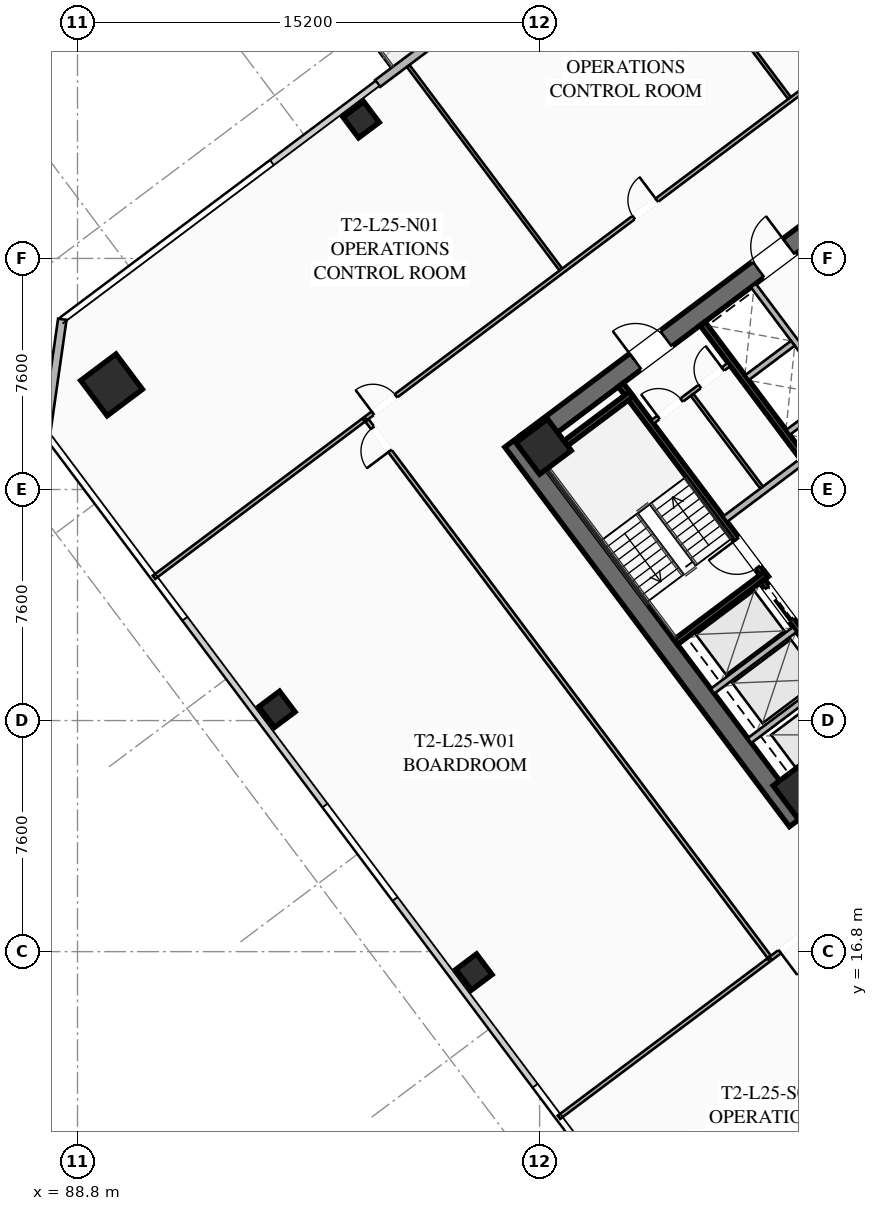
"""IFC4 building model, lengths in metres.
Left out: names, types, materials, properties, quantities, classifications, styles, units other than length and angle.
Written with IfcOpenShell. Run it as: python <this file> out.ifc"""

import sys

from ifc_helpers import new_model, si_unit, direction, frame, frame_2d, origin, origin_2d, place, context, subcontext, project, spatial, rectangle, hollow_rectangle, extrude, element, fill, save


model = new_model("IFC4")
c1 = context("Model", 3, precision=1e-05, world=origin(), true_north=direction((0.0, 1.0)))
c2 = subcontext(c1, "Body", "Model", "MODEL_VIEW")
j1 = project(units=[si_unit("LENGTHUNIT", "METRE"), si_unit("PLANEANGLEUNIT", "RADIAN")], contexts=[c1])
p1 = place(None, origin())
s1 = spatial("IfcSite", under=j1, at=p1, CompositionType="ELEMENT")
p2 = place(p1, origin())
s2 = spatial("IfcBuilding", under=s1, at=p2, CompositionType="ELEMENT")
p3 = place(p2, frame((0.0, 0.0, 95.6)))
s3 = spatial("IfcBuildingStorey", under=s2, at=p3, CompositionType="ELEMENT", Elevation=95.6)
p4 = place(p3, frame((112.476, 21.107, 0.0), z_axis=(0.0, 0.0, 1.0), x_axis=(-0.600005007985, 0.799996243986, 0.0)))
e1 = element("IfcWall", 1, at=p4, inside=s3, PredefinedType="SHEAR", context=c2, shape_type="SweptSolid", body=[
    extrude(rectangle(XDim=15.6, YDim=0.65, at=frame_2d((7.8, 0.0))), origin(), (0.0, 0.0, 1.0), 3.55),
])
p5 = place(p3, frame((124.429, 30.478, 0.0), z_axis=(0.0, 0.0, 1.0), x_axis=(-0.799998028465, -0.600002628705, 0.0)))
e2 = element("IfcWall", 2, at=p5, inside=s3, PredefinedType="SHEAR", context=c2, shape_type="SweptSolid", body=[
    extrude(rectangle(XDim=14.86, YDim=0.65, at=frame_2d((7.43, 0.0))), origin(), (0.0, 0.0, 1.0), 3.55),
])
p6 = place(p5, frame((9.13, 0.0, 0.0)))
e3 = element("IfcOpeningElement", 3, at=p6, cuts=e2, PredefinedType="OPENING", context=c2, shape_type="SweptSolid", body=[
    extrude(rectangle(XDim=1.25, YDim=2.25, at=frame_2d((0.625, 1.125))), frame((0.0, 0.335, 0.0), z_axis=(0.0, -1.0, 0.0), x_axis=(1.0, 0.0, 0.0)), (0.0, 0.0, 1.0), 0.67),
])
p7 = place(p5, frame((4.08, 0.0, 0.0)))
e4 = element("IfcOpeningElement", 4, at=p7, cuts=e2, PredefinedType="OPENING", context=c2, shape_type="SweptSolid", body=[
    extrude(rectangle(XDim=1.25, YDim=2.25, at=frame_2d((0.625, 1.125))), frame((0.0, 0.335, 0.0), z_axis=(0.0, -1.0, 0.0), x_axis=(1.0, 0.0, 0.0)), (0.0, 0.0, 1.0), 0.67),
])
p8 = place(p3, frame((103.571, 33.522, 0.0), z_axis=(0.0, 0.0, 1.0), x_axis=(0.799998028465, 0.600002628705, 0.0)))
e5 = element("IfcWall", 5, at=p8, inside=s3, PredefinedType="SHEAR", context=c2, shape_type="SweptSolid", body=[
    extrude(rectangle(XDim=14.86, YDim=0.65, at=frame_2d((7.43, 0.0))), origin(), (0.0, 0.0, 1.0), 3.55),
])
p9 = place(p8, frame((4.48, 0.0, 0.0)))
e6 = element("IfcOpeningElement", 6, at=p9, cuts=e5, PredefinedType="OPENING", context=c2, shape_type="SweptSolid", body=[
    extrude(rectangle(XDim=1.25, YDim=2.25, at=frame_2d((0.625, 1.125))), frame((0.0, 0.335, 0.0), z_axis=(0.0, -1.0, 0.0), x_axis=(1.0, 0.0, 0.0)), (0.0, 0.0, 1.0), 0.67),
])
p10 = place(p8, frame((9.53, 0.0, 0.0)))
e7 = element("IfcOpeningElement", 7, at=p10, cuts=e5, PredefinedType="OPENING", context=c2, shape_type="SweptSolid", body=[
    extrude(rectangle(XDim=1.25, YDim=2.25, at=frame_2d((0.625, 1.125))), frame((0.0, 0.335, 0.0), z_axis=(0.0, -1.0, 0.0), x_axis=(1.0, 0.0, 0.0)), (0.0, 0.0, 1.0), 0.67),
])
for number, where, z_axis, x_axis in (
    (8, (112.59, 22.13, 0.0), (0.0, 0.0, 1.0), (0.8, 0.6, 0.0)),
    (9, (104.13, 33.41, 0.0), (0.0, 0.0, 1.0), (0.8, 0.6, 0.0)),
):
    element("IfcColumn", number, at=place(p3, frame(where, z_axis=z_axis, x_axis=x_axis)), inside=s3, PredefinedType="COLUMN", context=c2, shape_type="SweptSolid", body=[
        extrude(hollow_rectangle(XDim=1.3, YDim=1.3, WallThickness=0.05, at=origin_2d()), origin(), (0.0, 0.0, 1.0), 3.35),
    ])
p11 = place(p3, frame((89.92, 35.44, 0.0), z_axis=(0.0, 0.0, 1.0), x_axis=(0.799999996291, 0.600000004945, 0.0)))
e10 = element("IfcColumn", 10, at=p11, inside=s3, PredefinedType="COLUMN", context=c2, shape_type="SweptSolid", body=[
    extrude(hollow_rectangle(XDim=1.45, YDim=1.45, WallThickness=0.055, at=origin_2d()), origin(), (0.0, 0.0, 1.0), 3.35),
])
for number, where, z_axis, x_axis in (
    (11, (98.13, 44.16, 0.0), (0.0, 0.0, 1.0), (0.8, 0.6, 0.0)),
    (12, (95.36, 24.77, 0.0), (0.0, 0.0, 1.0), (0.8, 0.6, 0.0)),
    (13, (101.84, 16.13, 0.0), (0.0, 0.0, 1.0), (0.8, 0.6, 0.0)),
):
    element("IfcColumn", number, at=place(p3, frame(where, z_axis=z_axis, x_axis=x_axis)), inside=s3, PredefinedType="COLUMN", context=c2, shape_type="SweptSolid", body=[
        extrude(hollow_rectangle(XDim=0.85, YDim=0.85, WallThickness=0.035, at=origin_2d()), origin(), (0.0, 0.0, 1.0), 3.35),
    ])
p12 = place(p3, frame((98.672, 45.354, 0.0), z_axis=(0.0, 0.0, 1.0), x_axis=(0.799986212866, 0.600018382406, 0.0)))
e14 = element("IfcWall", 14, at=p12, inside=s3, PredefinedType="SOLIDWALL", context=c2, shape_type="SweptSolid", body=[
    extrude(rectangle(XDim=8.5, YDim=0.28, at=frame_2d((4.25, 0.0))), origin(), (0.0, 0.0, 1.0), 3.35),
])
p13 = place(p12, frame((3.6, 0.0, 0.0)))
e15 = element("IfcOpeningElement", 15, at=p13, cuts=e14, PredefinedType="OPENING", context=c2, shape_type="SweptSolid", body=[
    extrude(rectangle(XDim=1.3, YDim=2.15, at=frame_2d((0.65, 1.075))), frame((0.0, 0.15, 0.0), z_axis=(0.0, -1.0, 0.0), x_axis=(1.0, 0.0, 0.0)), (0.0, 0.0, 1.0), 0.3),
])
p14 = place(p12, frame((5.24, 0.0, 0.85)))
e16 = element("IfcOpeningElement", 16, at=p14, cuts=e14, PredefinedType="OPENING", context=c2, shape_type="SweptSolid", body=[
    extrude(rectangle(XDim=1.8, YDim=1.92, at=frame_2d((0.9, 0.96))), frame((0.0, 0.15, 0.0), z_axis=(0.0, -1.0, 0.0), x_axis=(1.0, 0.0, 0.0)), (0.0, 0.0, 1.0), 0.3),
])
p15 = place(p3, frame((87.76, 33.82, 0.0), z_axis=(0.0, 0.0, 1.0), x_axis=(0.141430307517, 0.989948214866, 0.0)))
e17 = element("IfcWall", 17, at=p15, inside=s3, PredefinedType="SOLIDWALL", context=c2, shape_type="SweptSolid", body=[
    extrude(rectangle(XDim=3.818, YDim=0.28, at=frame_2d((1.909, 0.0))), origin(), (0.0, 0.0, 1.0), 3.35),
])
p16 = place(p3, frame((111.44, 29.08, 0.0), z_axis=(0.0, 0.0, 1.0), x_axis=(-0.600009827119, 0.799992629566, 0.0)))
e18 = element("IfcWall", 18, at=p16, inside=s3, PredefinedType="SHEAR", context=c2, shape_type="SweptSolid", body=[
    extrude(rectangle(XDim=7.95, YDim=0.2, at=frame_2d((3.975, 0.0))), origin(), (0.0, 0.0, 1.0), 3.35),
])
p17 = place(p16, frame((0.45, 0.0, 0.0)))
e19 = element("IfcOpeningElement", 19, at=p17, cuts=e18, PredefinedType="OPENING", context=c2, shape_type="SweptSolid", body=[
    extrude(rectangle(XDim=1.15, YDim=2.2, at=frame_2d((0.575, 1.1))), frame((0.0, 0.11, 0.0), z_axis=(0.0, -1.0, 0.0), x_axis=(1.0, 0.0, 0.0)), (0.0, 0.0, 1.0), 0.22),
])
for number, where, z_axis, x_axis in (
    (20, (108.476, 26.982, 0.0), (0.0, 0.0, 1.0), (0.8, 0.6, 0.0)),
    (21, (104.036, 32.902, 0.0), (0.0, 0.0, 1.0), (0.8, 0.6, 0.0)),
):
    element("IfcWall", number, at=place(p3, frame(where, z_axis=z_axis, x_axis=x_axis)), inside=s3, PredefinedType="SHEAR", context=c2, shape_type="SweptSolid", body=[
        extrude(rectangle(XDim=3.73, YDim=0.2, at=frame_2d((1.865, 0.0))), origin(), (0.0, 0.0, 1.0), 3.35),
    ])
p18 = place(p3, frame((117.938, 26.016, 0.0), z_axis=(0.0, 0.0, 1.0), x_axis=(-0.600005463273, 0.799995902516, 0.0)))
e22 = element("IfcWall", 22, at=p18, inside=s3, PredefinedType="SHEAR", context=c2, shape_type="SweptSolid", body=[
    extrude(rectangle(XDim=14.3, YDim=0.2, at=frame_2d((7.15, 0.0))), origin(), (0.0, 0.0, 1.0), 3.35),
])
p19 = place(p3, frame((110.104, 31.028, 0.0), z_axis=(0.0, 0.0, 1.0), x_axis=(0.800018601094, 0.59997519774, 0.0)))
e23 = element("IfcWall", 23, at=p19, inside=s3, PredefinedType="SOLIDWALL", context=c2, shape_type="SweptSolid", body=[
    extrude(rectangle(XDim=3.15, YDim=0.22, at=frame_2d((1.575, 0.0))), origin(), (0.0, 0.0, 1.0), 2.703),
])
p20 = place(p3, frame((115.13, 23.91, 0.0), z_axis=(0.0, 0.0, 1.0), x_axis=(-0.599975393228, 0.800018454488, 0.0)))
e24 = element("IfcWall", 24, at=p20, inside=s3, PredefinedType="SHEAR", context=c2, shape_type="SweptSolid", body=[
    extrude(rectangle(XDim=6.35, YDim=0.2, at=frame_2d((3.175, 0.0))), origin(), (0.0, 0.0, 1.0), 3.35),
])
p21 = place(p20, frame((4.775, 0.0, 0.0)))
e25 = element("IfcOpeningElement", 25, at=p21, cuts=e24, PredefinedType="OPENING", context=c2, shape_type="SweptSolid", body=[
    extrude(rectangle(XDim=1.3, YDim=2.25, at=frame_2d((0.65, 1.125))), frame((0.0, 0.11, 0.0), z_axis=(0.0, -1.0, 0.0), x_axis=(1.0, 0.0, 0.0)), (0.0, 0.0, 1.0), 0.22),
])
p22 = place(p20, frame((2.775, 0.0, 0.0)))
e26 = element("IfcOpeningElement", 26, at=p22, cuts=e24, PredefinedType="OPENING", context=c2, shape_type="SweptSolid", body=[
    extrude(rectangle(XDim=1.3, YDim=2.25, at=frame_2d((0.65, 1.125))), frame((0.0, 0.11, 0.0), z_axis=(0.0, -1.0, 0.0), x_axis=(1.0, 0.0, 0.0)), (0.0, 0.0, 1.0), 0.22),
])
p23 = place(p20, frame((0.575, 0.0, 0.0)))
e27 = element("IfcOpeningElement", 27, at=p23, cuts=e24, PredefinedType="OPENING", context=c2, shape_type="SweptSolid", body=[
    extrude(rectangle(XDim=1.3, YDim=2.25, at=frame_2d((0.65, 1.125))), frame((0.0, 0.11, 0.0), z_axis=(0.0, -1.0, 0.0), x_axis=(1.0, 0.0, 0.0)), (0.0, 0.0, 1.0), 0.22),
])
for number, where, z_axis, x_axis in (
    (28, (110.906, 23.742, 0.0), (0.0, 0.0, 1.0), (0.8, 0.6, 0.0)),
    (29, (109.688, 25.366, 0.0), (0.0, 0.0, 1.0), (0.8, 0.6, 0.0)),
):
    element("IfcWall", number, at=place(p3, frame(where, z_axis=z_axis, x_axis=x_axis)), inside=s3, PredefinedType="SOLIDWALL", context=c2, shape_type="SweptSolid", body=[
        extrude(rectangle(XDim=3.38, YDim=0.2, at=frame_2d((1.69, 0.0))), origin(), (0.0, 0.0, 1.0), 3.35),
    ])
p24 = place(p3, frame((107.71, 34.22, 0.0), z_axis=(0.0, 0.0, 1.0), x_axis=(0.799981399002, 0.60002480053, 0.0)))
e30 = element("IfcWall", 30, at=p24, inside=s3, PredefinedType="PARTITIONING", context=c2, shape_type="SweptSolid", body=[
    extrude(rectangle(XDim=3.15, YDim=0.135, at=frame_2d((1.575, 0.0))), origin(), (0.0, 0.0, 1.0), 2.703),
])
p25 = place(p24, frame((0.25, 0.0, 0.0)))
e31 = element("IfcOpeningElement", 31, at=p25, cuts=e30, PredefinedType="OPENING", context=c2, shape_type="SweptSolid", body=[
    extrude(rectangle(XDim=0.95, YDim=2.05, at=frame_2d((0.475, 1.025))), frame((0.0, 0.077, 0.0), z_axis=(0.0, -1.0, 0.0), x_axis=(1.0, 0.0, 0.0)), (0.0, 0.0, 1.0), 0.155),
])
p26 = place(p24, frame((1.95, 0.0, 0.0)))
e32 = element("IfcOpeningElement", 32, at=p26, cuts=e30, PredefinedType="OPENING", context=c2, shape_type="SweptSolid", body=[
    extrude(rectangle(XDim=0.95, YDim=2.05, at=frame_2d((0.475, 1.025))), frame((0.0, 0.077, 0.0), z_axis=(0.0, -1.0, 0.0), x_axis=(1.0, 0.0, 0.0)), (0.0, 0.0, 1.0), 0.155),
])
p27 = place(p3, frame((111.296, 32.072, 0.0), z_axis=(0.0, 0.0, 1.0), x_axis=(-0.59995887973, 0.800030838552, 0.0)))
e33 = element("IfcWall", 33, at=p27, inside=s3, PredefinedType="PARTITIONING", context=c2, shape_type="SweptSolid", body=[
    extrude(rectangle(XDim=3.8, YDim=0.11, at=frame_2d((1.9, 0.0))), origin(), (0.0, 0.0, 1.0), 2.703),
])
p28 = place(p3, frame((115.11, 33.27, 0.0), z_axis=(0.0, 0.0, 1.0), x_axis=(-0.600011488909, 0.79999138319, 0.0)))
e34 = element("IfcWall", 34, at=p28, inside=s3, PredefinedType="SOLIDWALL", context=c2, shape_type="SweptSolid", body=[
    extrude(rectangle(XDim=6.8, YDim=0.2, at=frame_2d((3.4, 0.0))), origin(), (0.0, 0.0, 1.0), 3.35),
])
p29 = place(p3, frame((112.176, 33.882, 0.0), z_axis=(0.0, 0.0, 1.0), x_axis=(0.8, 0.6, 0.0)))
e35 = element("IfcWall", 35, at=p29, inside=s3, PredefinedType="SOLIDWALL", context=c2, shape_type="SweptSolid", body=[
    extrude(rectangle(XDim=1.88, YDim=0.2, at=frame_2d((0.94, 0.0))), origin(), (0.0, 0.0, 1.0), 3.35),
])
p30 = place(p3, frame((110.826, 35.682, 0.0), z_axis=(0.0, 0.0, 1.0), x_axis=(0.799984418148, 0.600020775241, 0.0)))
e36 = element("IfcWall", 36, at=p30, inside=s3, PredefinedType="SOLIDWALL", context=c2, shape_type="SweptSolid", body=[
    extrude(rectangle(XDim=1.88, YDim=0.2, at=frame_2d((0.94, 0.0))), origin(), (0.0, 0.0, 1.0), 3.35),
])
p31 = place(p3, frame((98.276, 34.332, 0.0), z_axis=(0.0, 0.0, 1.0), x_axis=(0.800003113347, 0.599995848849, 0.0)))
e37 = element("IfcWall", 37, at=p31, inside=s3, PredefinedType="PARTITIONING", context=c2, shape_type="SweptSolid", body=[
    extrude(rectangle(XDim=28.23, YDim=0.135, at=frame_2d((14.115, 0.0))), origin(), (0.0, 0.0, 1.0), 2.703),
])
p32 = place(p31, frame((0.3, 0.0, 0.0)))
e38 = element("IfcOpeningElement", 38, at=p32, cuts=e37, PredefinedType="OPENING", context=c2, shape_type="SweptSolid", body=[
    extrude(rectangle(XDim=0.95, YDim=2.05, at=frame_2d((0.475, 1.025))), frame((0.0, 0.077, 0.0), z_axis=(0.0, -1.0, 0.0), x_axis=(1.0, 0.0, 0.0)), (0.0, 0.0, 1.0), 0.155),
])
p33 = place(p31, frame((11.023, 0.0, 0.0)))
e39 = element("IfcOpeningElement", 39, at=p33, cuts=e37, PredefinedType="OPENING", context=c2, shape_type="SweptSolid", body=[
    extrude(rectangle(XDim=0.95, YDim=2.05, at=frame_2d((0.475, 1.025))), frame((0.0, 0.077, 0.0), z_axis=(0.0, -1.0, 0.0), x_axis=(1.0, 0.0, 0.0)), (0.0, 0.0, 1.0), 0.155),
])
p34 = place(p31, frame((26.98, 0.0, 0.0)))
e40 = element("IfcOpeningElement", 40, at=p34, cuts=e37, PredefinedType="OPENING", context=c2, shape_type="SweptSolid", body=[
    extrude(rectangle(XDim=0.95, YDim=2.05, at=frame_2d((0.475, 1.025))), frame((0.0, 0.077, 0.0), z_axis=(0.0, -1.0, 0.0), x_axis=(1.0, 0.0, 0.0)), (0.0, 0.0, 1.0), 0.155),
])
p35 = place(p3, frame((104.692, 39.244, 0.0), z_axis=(0.0, 0.0, 1.0), x_axis=(-0.599990643836, 0.800007017038, 0.0)))
e41 = element("IfcWall", 41, at=p35, inside=s3, PredefinedType="PARTITIONING", context=c2, shape_type="SweptSolid", body=[
    extrude(rectangle(XDim=8.35, YDim=0.11, at=frame_2d((4.175, 0.0))), origin(), (0.0, 0.0, 1.0), 2.703),
])
p36 = place(p3, frame((112.212, 44.884, 0.0), z_axis=(0.0, 0.0, 1.0), x_axis=(-0.600004678161, 0.799996491358, 0.0)))
e42 = element("IfcWall", 42, at=p36, inside=s3, PredefinedType="PARTITIONING", context=c2, shape_type="SweptSolid", body=[
    extrude(rectangle(XDim=8.35, YDim=0.11, at=frame_2d((4.175, 0.0))), origin(), (0.0, 0.0, 1.0), 2.703),
])
p37 = place(p3, frame((134.18, 33.51, 0.0), z_axis=(0.0, 0.0, 1.0), x_axis=(-0.8, -0.6, 0.0)))
e43 = element("IfcWall", 43, at=p37, inside=s3, PredefinedType="PARTITIONING", context=c2, shape_type="SweptSolid", body=[
    extrude(rectangle(XDim=28.23, YDim=0.135, at=frame_2d((14.115, 0.0))), origin(), (0.0, 0.0, 1.0), 2.703),
])
p38 = place(p37, frame((26.9, 0.0, 0.0)))
e44 = element("IfcOpeningElement", 44, at=p38, cuts=e43, PredefinedType="OPENING", context=c2, shape_type="SweptSolid", body=[
    extrude(rectangle(XDim=0.95, YDim=2.05, at=frame_2d((0.475, 1.025))), frame((0.0, 0.077, 0.0), z_axis=(0.0, -1.0, 0.0), x_axis=(1.0, 0.0, 0.0)), (0.0, 0.0, 1.0), 0.155),
])
p39 = place(p37, frame((20.314, 0.0, 0.0)))
e45 = element("IfcOpeningElement", 45, at=p39, cuts=e43, PredefinedType="OPENING", context=c2, shape_type="SweptSolid", body=[
    extrude(rectangle(XDim=0.95, YDim=2.05, at=frame_2d((0.475, 1.025))), frame((0.0, 0.077, 0.0), z_axis=(0.0, -1.0, 0.0), x_axis=(1.0, 0.0, 0.0)), (0.0, 0.0, 1.0), 0.155),
])
p40 = place(p37, frame((0.38, 0.0, 0.0)))
e46 = element("IfcOpeningElement", 46, at=p40, cuts=e43, PredefinedType="OPENING", context=c2, shape_type="SweptSolid", body=[
    extrude(rectangle(XDim=0.95, YDim=2.05, at=frame_2d((0.475, 1.025))), frame((0.0, 0.077, 0.0), z_axis=(0.0, -1.0, 0.0), x_axis=(1.0, 0.0, 0.0)), (0.0, 0.0, 1.0), 0.155),
])
p41 = place(p3, frame((111.548, 16.636, 0.0), z_axis=(0.0, 0.0, 1.0), x_axis=(-0.600001772333, 0.799998670747, 0.0)))
e47 = element("IfcWall", 47, at=p41, inside=s3, PredefinedType="PARTITIONING", context=c2, shape_type="SweptSolid", body=[
    extrude(rectangle(XDim=22.04, YDim=0.135, at=frame_2d((11.02, 0.0))), origin(), (0.0, 0.0, 1.0), 2.703),
])
p42 = place(p41, frame((20.79, 0.0, 0.0)))
e48 = element("IfcOpeningElement", 48, at=p42, cuts=e47, PredefinedType="OPENING", context=c2, shape_type="SweptSolid", body=[
    extrude(rectangle(XDim=0.95, YDim=2.05, at=frame_2d((0.475, 1.025))), frame((0.0, 0.077, 0.0), z_axis=(0.0, -1.0, 0.0), x_axis=(1.0, 0.0, 0.0)), (0.0, 0.0, 1.0), 0.155),
])
for number, where, z_axis, x_axis in (
    (49, (98.212, 34.284, 0.0), (0.0, 0.0, 1.0), (-0.8, -0.6, 0.0)),
    (50, (104.636, 11.352, 0.0), (0.0, 0.0, 1.0), (0.8, 0.6, 0.0)),
):
    element("IfcWall", number, at=place(p3, frame(where, z_axis=z_axis, x_axis=x_axis)), inside=s3, PredefinedType="PARTITIONING", context=c2, shape_type="SweptSolid", body=[
        extrude(rectangle(XDim=8.62, YDim=0.135, at=frame_2d((4.31, 0.0))), origin(), (0.0, 0.0, 1.0), 2.703),
    ])
p43 = place(p9, origin())
e51 = element("IfcDoor", 51, at=p43, inside=s3, OperationType="SINGLE_SWING_LEFT", PredefinedType="DOOR", context=c2, shape_type="SweptSolid", body=[
    extrude(rectangle(XDim=1.25, YDim=2.25, at=frame_2d((0.625, 1.125))), frame((0.0, 0.025, 0.0), z_axis=(0.0, -1.0, 0.0), x_axis=(1.0, 0.0, 0.0)), (0.0, 0.0, 1.0), 0.05),
])
fill(e6, e51)
p44 = place(p10, origin())
e52 = element("IfcDoor", 52, at=p44, inside=s3, OperationType="SINGLE_SWING_RIGHT", PredefinedType="DOOR", context=c2, shape_type="SweptSolid", body=[
    extrude(rectangle(XDim=1.25, YDim=2.25, at=frame_2d((0.625, 1.125))), frame((0.0, 0.025, 0.0), z_axis=(0.0, -1.0, 0.0), x_axis=(1.0, 0.0, 0.0)), (0.0, 0.0, 1.0), 0.05),
])
fill(e7, e52)
p45 = place(p17, origin())
e53 = element("IfcDoor", 53, at=p45, inside=s3, OperationType="SINGLE_SWING_RIGHT", PredefinedType="DOOR", context=c2, shape_type="SweptSolid", body=[
    extrude(rectangle(XDim=1.15, YDim=2.2, at=frame_2d((0.575, 1.1))), frame((0.0, 0.025, 0.0), z_axis=(0.0, -1.0, 0.0), x_axis=(1.0, 0.0, 0.0)), (0.0, 0.0, 1.0), 0.05),
])
fill(e19, e53)
p46 = place(p25, origin())
e54 = element("IfcDoor", 54, at=p46, inside=s3, OperationType="SINGLE_SWING_LEFT", PredefinedType="DOOR", context=c2, shape_type="SweptSolid", body=[
    extrude(rectangle(XDim=0.95, YDim=2.05, at=frame_2d((0.475, 1.025))), frame((0.0, 0.025, 0.0), z_axis=(0.0, -1.0, 0.0), x_axis=(1.0, 0.0, 0.0)), (0.0, 0.0, 1.0), 0.05),
])
fill(e31, e54)
p47 = place(p26, origin())
e55 = element("IfcDoor", 55, at=p47, inside=s3, OperationType="SINGLE_SWING_RIGHT", PredefinedType="DOOR", context=c2, shape_type="SweptSolid", body=[
    extrude(rectangle(XDim=0.95, YDim=2.05, at=frame_2d((0.475, 1.025))), frame((0.0, 0.025, 0.0), z_axis=(0.0, -1.0, 0.0), x_axis=(1.0, 0.0, 0.0)), (0.0, 0.0, 1.0), 0.05),
])
fill(e32, e55)
p48 = place(p32, origin())
e56 = element("IfcDoor", 56, at=p48, inside=s3, OperationType="SINGLE_SWING_LEFT", PredefinedType="DOOR", context=c2, shape_type="SweptSolid", body=[
    extrude(rectangle(XDim=0.95, YDim=2.05, at=frame_2d((0.475, 1.025))), frame((0.0, 0.025, 0.0), z_axis=(0.0, -1.0, 0.0), x_axis=(1.0, 0.0, 0.0)), (0.0, 0.0, 1.0), 0.05),
])
fill(e38, e56)
p49 = place(p33, origin())
e57 = element("IfcDoor", 57, at=p49, inside=s3, OperationType="SINGLE_SWING_RIGHT", PredefinedType="DOOR", context=c2, shape_type="SweptSolid", body=[
    extrude(rectangle(XDim=0.95, YDim=2.05, at=frame_2d((0.475, 1.025))), frame((0.0, 0.025, 0.0), z_axis=(0.0, -1.0, 0.0), x_axis=(1.0, 0.0, 0.0)), (0.0, 0.0, 1.0), 0.05),
])
fill(e39, e57)
p50 = place(p38, origin())
e58 = element("IfcDoor", 58, at=p50, inside=s3, OperationType="SINGLE_SWING_RIGHT", PredefinedType="DOOR", context=c2, shape_type="SweptSolid", body=[
    extrude(rectangle(XDim=0.95, YDim=2.05, at=frame_2d((0.475, 1.025))), frame((0.0, 0.025, 0.0), z_axis=(0.0, -1.0, 0.0), x_axis=(1.0, 0.0, 0.0)), (0.0, 0.0, 1.0), 0.05),
])
fill(e44, e58)
p51 = place(p42, origin())
e59 = element("IfcDoor", 59, at=p51, inside=s3, OperationType="SINGLE_SWING_LEFT", PredefinedType="DOOR", context=c2, shape_type="SweptSolid", body=[
    extrude(rectangle(XDim=0.95, YDim=2.05, at=frame_2d((0.475, 1.025))), frame((0.0, 0.025, 0.0), z_axis=(0.0, -1.0, 0.0), x_axis=(1.0, 0.0, 0.0)), (0.0, 0.0, 1.0), 0.05),
])
fill(e48, e59)
p52 = place(p21, origin())
e60 = element("IfcDoor", 60, at=p52, inside=s3, OperationType="SLIDING_TO_LEFT", PredefinedType="DOOR", context=c2, shape_type="SweptSolid", body=[
    extrude(rectangle(XDim=1.3, YDim=2.25, at=frame_2d((0.65, 1.125))), frame((0.0, 0.025, 0.0), z_axis=(0.0, -1.0, 0.0), x_axis=(1.0, 0.0, 0.0)), (0.0, 0.0, 1.0), 0.05),
])
fill(e25, e60)
save(model, sys.argv[1])
